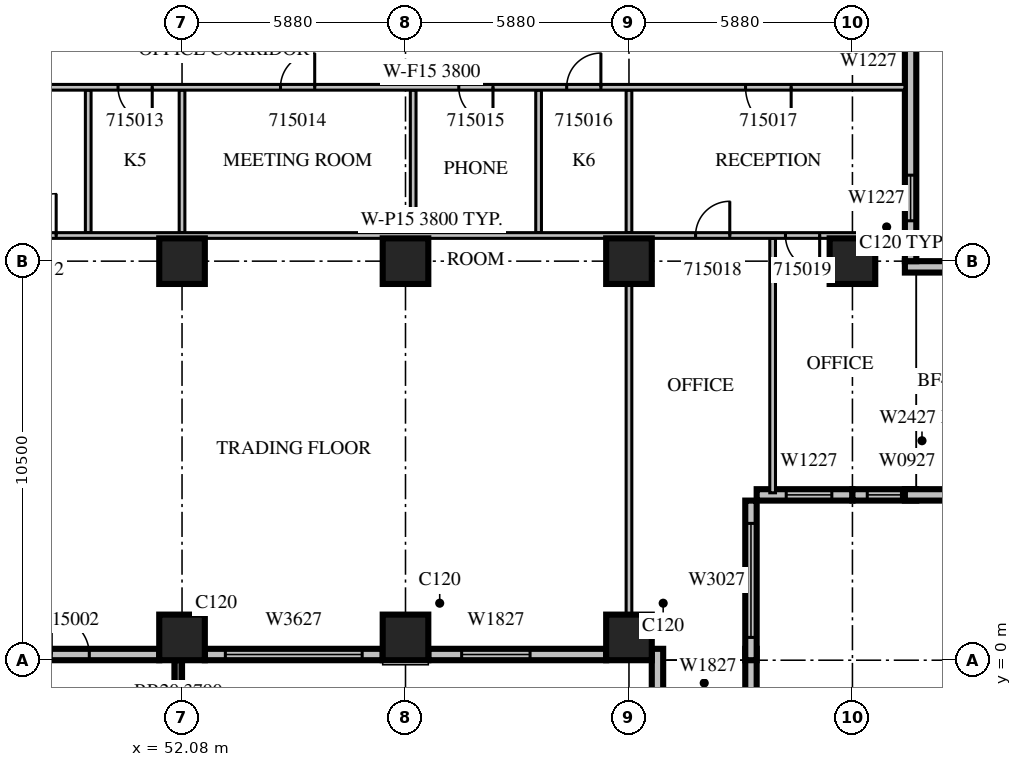
"""IFC4 building model, lengths in metres.
Left out: names, types, materials, properties, quantities, classifications, styles, units other than length and angle.
Written with IfcOpenShell. Run it as: python <this file> out.ifc"""

import sys

from ifc_helpers import new_model, si_unit, direction, frame, frame_2d, origin, origin_2d, place, context, subcontext, project, spatial, rectangle, extrude, source, transform, mapped, element, fill, save


model = new_model("IFC4")
c1 = context("Model", 3, precision=1e-05, world=origin(), true_north=direction((0.0, 1.0)))
c2 = subcontext(c1, "Body", "Model", "MODEL_VIEW")
j1 = project(units=[si_unit("LENGTHUNIT", "METRE"), si_unit("PLANEANGLEUNIT", "RADIAN")], contexts=[c1])
p1 = place(None, origin())
s1 = spatial("IfcSite", under=j1, at=p1, CompositionType="ELEMENT")
p2 = place(p1, origin())
s2 = spatial("IfcBuilding", under=s1, at=p2, CompositionType="ELEMENT")
p3 = place(p2, frame((0.0, 0.0, 74.1)))
s3 = spatial("IfcBuildingStorey", under=s2, at=p3, CompositionType="ELEMENT", Elevation=74.1)
m1 = source(origin(), c2, "Body", "SweptSolid", [
    extrude(rectangle(XDim=1.2, YDim=1.2, at=origin_2d()), origin(), (0.0, 0.0, 1.0), 4.2),
])
for number, where, z_axis, x_axis in (
    (1, (52.08, 0.6, 0.0), (0.0, 0.0, 1.0), (1.0, 0.0, 0.0)),
    (2, (57.96, 0.6, 0.0), (0.0, 0.0, 1.0), (1.0, 0.0, 0.0)),
    (3, (63.84, 0.6, 0.0), (0.0, 0.0, 1.0), (1.0, 0.0, 0.0)),
    (4, (52.08, 10.5, 0.0), (0.0, 0.0, 1.0), (1.0, 0.0, 0.0)),
    (5, (57.96, 10.5, 0.0), (0.0, 0.0, 1.0), (1.0, 0.0, 0.0)),
    (6, (63.84, 10.5, 0.0), (0.0, 0.0, 1.0), (1.0, 0.0, 0.0)),
    (7, (69.72, 10.5, 0.0), (0.0, 0.0, 1.0), (1.0, 0.0, 0.0)),
):
    element("IfcColumn", number, at=place(p3, frame(where, z_axis=z_axis, x_axis=x_axis)), inside=s3, PredefinedType="COLUMN", context=c2, shape_type="MappedRepresentation", body=[
        mapped(m1, transform((0.0, 0.0, 0.0), scale=1.0)),
    ])
m2 = source(origin(), c2, "Body", "SweptSolid", [
    extrude(rectangle(XDim=4.68, YDim=0.3, at=frame_2d((2.34, 0.0))), origin(), (0.0, 0.0, 1.0), 3.8),
])
p4 = place(p3, frame((46.8, 0.15, 0.0), z_axis=(0.0, 0.0, 1.0), x_axis=(1.0, 0.0, 0.0)))
e8 = element("IfcWall", 8, at=p4, inside=s3, PredefinedType="STANDARD", context=c2, shape_type="MappedRepresentation", body=[
    mapped(m2, transform((0.0, 0.0, 0.0), scale=1.0)),
])
m3 = source(origin(), c2, "Body", "SweptSolid", [
    extrude(rectangle(XDim=1.0, YDim=2.1, at=frame_2d((0.5, 1.05))), frame((0.0, 0.16, 0.0), z_axis=(0.0, -1.0, 0.0), x_axis=(1.0, 0.0, 0.0)), (0.0, 0.0, 1.0), 0.32),
])
p5 = place(p4, frame((1.84, 0.0, 0.0)))
e9 = element("IfcOpeningElement", 9, at=p5, cuts=e8, PredefinedType="OPENING", context=c2, shape_type="MappedRepresentation", body=[
    mapped(m3, transform((0.0, 0.0, 0.0), scale=1.0)),
])
p6 = place(p3, frame((52.68, 0.15, 0.0), z_axis=(0.0, 0.0, 1.0), x_axis=(1.0, 0.0, 0.0)))
e10 = element("IfcWall", 10, at=p6, inside=s3, PredefinedType="STANDARD", context=c2, shape_type="MappedRepresentation", body=[
    mapped(m2, transform((0.0, 0.0, 0.0), scale=1.0)),
])
m4 = source(origin(), c2, "Body", "SweptSolid", [
    extrude(rectangle(XDim=3.6, YDim=2.7, at=frame_2d((1.8, 1.35))), frame((0.0, 0.16, 0.0), z_axis=(0.0, -1.0, 0.0), x_axis=(1.0, 0.0, 0.0)), (0.0, 0.0, 1.0), 0.32),
])
p7 = place(p6, frame((0.54, 0.0, 0.6)))
e11 = element("IfcOpeningElement", 11, at=p7, cuts=e10, PredefinedType="OPENING", context=c2, shape_type="MappedRepresentation", body=[
    mapped(m4, transform((0.0, 0.0, 0.0), scale=1.0)),
])
p8 = place(p3, frame((58.56, 0.15, 0.0), z_axis=(0.0, 0.0, 1.0), x_axis=(1.0, 0.0, 0.0)))
e12 = element("IfcWall", 12, at=p8, inside=s3, PredefinedType="STANDARD", context=c2, shape_type="MappedRepresentation", body=[
    mapped(m2, transform((0.0, 0.0, 0.0), scale=1.0)),
])
m5 = source(origin(), c2, "Body", "SweptSolid", [
    extrude(rectangle(XDim=1.8, YDim=2.7, at=frame_2d((0.9, 1.35))), frame((0.0, 0.16, 0.0), z_axis=(0.0, -1.0, 0.0), x_axis=(1.0, 0.0, 0.0)), (0.0, 0.0, 1.0), 0.32),
])
p9 = place(p8, frame((0.877, 0.0, 0.6)))
e13 = element("IfcOpeningElement", 13, at=p9, cuts=e12, PredefinedType="OPENING", context=c2, shape_type="MappedRepresentation", body=[
    mapped(m5, transform((0.0, 0.0, 0.0), scale=1.0)),
])
m6 = source(origin(), c2, "Body", "SweptSolid", [
    extrude(rectangle(XDim=1.2, YDim=0.3, at=frame_2d((0.6, 0.0))), origin(), (0.0, 0.0, 1.0), 3.8),
])
for number, where, z_axis, x_axis in (
    (14, (64.59, 0.3, 0.0), (0.0, 0.0, 1.0), (0.0, -1.0, 0.0)),
    (15, (67.05, 0.3, 0.0), (0.0, 0.0, 1.0), (0.0, -1.0, 0.0)),
):
    element("IfcWall", number, at=place(p3, frame(where, z_axis=z_axis, x_axis=x_axis)), inside=s3, PredefinedType="STANDARD", context=c2, shape_type="MappedRepresentation", body=[
        mapped(m6, transform((0.0, 0.0, 0.0), scale=1.0)),
    ])
m7 = source(origin(), c2, "Body", "SweptSolid", [
    extrude(rectangle(XDim=4.2, YDim=0.3, at=frame_2d((2.1, 0.0))), origin(), (0.0, 0.0, 1.0), 3.8),
])
p10 = place(p3, frame((67.05, 0.0, 0.0), z_axis=(0.0, 0.0, 1.0), x_axis=(0.0, 1.0, 0.0)))
e16 = element("IfcWall", 16, at=p10, inside=s3, PredefinedType="STANDARD", context=c2, shape_type="MappedRepresentation", body=[
    mapped(m7, transform((0.0, 0.0, 0.0), scale=1.0)),
])
m8 = source(origin(), c2, "Body", "SweptSolid", [
    extrude(rectangle(XDim=3.0, YDim=2.7, at=frame_2d((1.5, 1.35))), frame((0.0, 0.16, 0.0), z_axis=(0.0, -1.0, 0.0), x_axis=(1.0, 0.0, 0.0)), (0.0, 0.0, 1.0), 0.32),
])
p11 = place(p10, frame((0.6, 0.0, 0.6)))
e17 = element("IfcOpeningElement", 17, at=p11, cuts=e16, PredefinedType="OPENING", context=c2, shape_type="MappedRepresentation", body=[
    mapped(m8, transform((0.0, 0.0, 0.0), scale=1.0)),
])
m9 = source(origin(), c2, "Body", "SweptSolid", [
    extrude(rectangle(XDim=2.52, YDim=0.3, at=frame_2d((1.26, 0.0))), origin(), (0.0, 0.0, 1.0), 3.8),
])
p12 = place(p3, frame((67.2, 4.35, 0.0), z_axis=(0.0, 0.0, 1.0), x_axis=(1.0, 0.0, 0.0)))
e18 = element("IfcWall", 18, at=p12, inside=s3, PredefinedType="STANDARD", context=c2, shape_type="MappedRepresentation", body=[
    mapped(m9, transform((0.0, 0.0, 0.0), scale=1.0)),
])
m10 = source(origin(), c2, "Body", "SweptSolid", [
    extrude(rectangle(XDim=1.2, YDim=2.7, at=frame_2d((0.6, 1.35))), frame((0.0, 0.16, 0.0), z_axis=(0.0, -1.0, 0.0), x_axis=(1.0, 0.0, 0.0)), (0.0, 0.0, 1.0), 0.32),
])
p13 = place(p12, frame((0.777, 0.0, 0.6)))
e19 = element("IfcOpeningElement", 19, at=p13, cuts=e18, PredefinedType="OPENING", context=c2, shape_type="MappedRepresentation", body=[
    mapped(m10, transform((0.0, 0.0, 0.0), scale=1.0)),
])
m11 = source(origin(), c2, "Body", "SweptSolid", [
    extrude(rectangle(XDim=1.68, YDim=0.3, at=frame_2d((0.84, 0.0))), origin(), (0.0, 0.0, 1.0), 3.8),
])
p14 = place(p3, frame((69.72, 4.35, 0.0), z_axis=(0.0, 0.0, 1.0), x_axis=(1.0, 0.0, 0.0)))
e20 = element("IfcWall", 20, at=p14, inside=s3, PredefinedType="STANDARD", context=c2, shape_type="MappedRepresentation", body=[
    mapped(m11, transform((0.0, 0.0, 0.0), scale=1.0)),
])
m12 = source(origin(), c2, "Body", "SweptSolid", [
    extrude(rectangle(XDim=0.9, YDim=2.7, at=frame_2d((0.45, 1.35))), frame((0.0, 0.16, 0.0), z_axis=(0.0, -1.0, 0.0), x_axis=(1.0, 0.0, 0.0)), (0.0, 0.0, 1.0), 0.32),
])
p15 = place(p14, frame((0.39, 0.0, 0.6)))
e21 = element("IfcOpeningElement", 21, at=p15, cuts=e20, PredefinedType="OPENING", context=c2, shape_type="MappedRepresentation", body=[
    mapped(m12, transform((0.0, 0.0, 0.0), scale=1.0)),
])
for number, where, z_axis, x_axis in (
    (22, (71.1, 4.35, 0.0), (0.0, 0.0, 1.0), (1.0, 0.0, 0.0)),
    (23, (71.1, 10.35, 0.0), (0.0, 0.0, 1.0), (1.0, 0.0, 0.0)),
):
    element("IfcWall", number, at=place(p3, frame(where, z_axis=z_axis, x_axis=x_axis)), inside=s3, PredefinedType="STANDARD", context=c2, shape_type="MappedRepresentation", body=[
        mapped(m6, transform((0.0, 0.0, 0.0), scale=1.0)),
    ])
m13 = source(origin(), c2, "Body", "SweptSolid", [
    extrude(rectangle(XDim=6.3, YDim=0.3, at=frame_2d((3.15, 0.0))), origin(), (0.0, 0.0, 1.0), 3.8),
])
p16 = place(p3, frame((71.25, 10.5, 0.0), z_axis=(0.0, 0.0, 1.0), x_axis=(0.0, 1.0, 0.0)))
e24 = element("IfcWall", 24, at=p16, inside=s3, PredefinedType="STANDARD", context=c2, shape_type="MappedRepresentation", body=[
    mapped(m13, transform((0.0, 0.0, 0.0), scale=1.0)),
])
p17 = place(p16, frame((1.062, 0.0, 0.6)))
e25 = element("IfcOpeningElement", 25, at=p17, cuts=e24, PredefinedType="OPENING", context=c2, shape_type="MappedRepresentation", body=[
    mapped(m10, transform((0.0, 0.0, 0.0), scale=1.0)),
])
m14 = source(origin(), c2, "Body", "SweptSolid", [
    extrude(rectangle(XDim=3.9, YDim=0.2, at=frame_2d((1.95, 0.0))), origin(), (0.0, 0.0, 1.0), 3.79),
])
p18 = place(p3, frame((51.98, 0.0, 0.0), z_axis=(0.0, 0.0, 1.0), x_axis=(0.0, -1.0, 0.0)))
e26 = element("IfcWall", 26, at=p18, inside=s3, PredefinedType="SOLIDWALL", context=c2, shape_type="MappedRepresentation", body=[
    mapped(m14, transform((0.0, 0.0, 0.0), scale=1.0)),
])
m15 = source(origin(), c2, "Body", "SweptSolid", [
    extrude(rectangle(XDim=2.4, YDim=2.7, at=frame_2d((1.2, 1.35))), frame((0.0, 0.11, 0.0), z_axis=(0.0, -1.0, 0.0), x_axis=(1.0, 0.0, 0.0)), (0.0, 0.0, 1.0), 0.22),
])
p19 = place(p18, frame((0.75, 0.0, 0.6)))
e27 = element("IfcOpeningElement", 27, at=p19, cuts=e26, PredefinedType="OPENING", context=c2, shape_type="MappedRepresentation", body=[
    mapped(m15, transform((0.0, 0.0, 0.0), scale=1.0)),
])
m16 = source(origin(), c2, "Body", "SweptSolid", [
    extrude(rectangle(XDim=3.75, YDim=0.15, at=frame_2d((1.875, 0.0))), origin(), (0.0, 0.0, 1.0), 3.8),
])
for number, where, z_axis, x_axis in (
    (28, (49.612, 11.25, 0.0), (0.0, 0.0, 1.0), (0.0, 1.0, 0.0)),
    (29, (52.08, 11.25, 0.0), (0.0, 0.0, 1.0), (0.0, 1.0, 0.0)),
    (30, (58.162, 11.25, 0.0), (0.0, 0.0, 1.0), (0.0, 1.0, 0.0)),
    (31, (61.462, 11.25, 0.0), (0.0, 0.0, 1.0), (0.0, 1.0, 0.0)),
):
    element("IfcWall", number, at=place(p3, frame(where, z_axis=z_axis, x_axis=x_axis)), inside=s3, PredefinedType="PARTITIONING", context=c2, shape_type="MappedRepresentation", body=[
        mapped(m16, transform((0.0, 0.0, 0.0), scale=1.0)),
    ])
m17 = source(origin(), c2, "Body", "SweptSolid", [
    extrude(rectangle(XDim=6.695, YDim=0.15, at=frame_2d((3.348, 0.0))), origin(), (0.0, 0.0, 1.0), 3.8),
])
p20 = place(p3, frame((67.62, 4.405, 0.0), z_axis=(0.0, 0.0, 1.0), x_axis=(0.0, 1.0, 0.0)))
e32 = element("IfcWall", 32, at=p20, inside=s3, PredefinedType="PARTITIONING", context=c2, shape_type="MappedRepresentation", body=[
    mapped(m17, transform((0.0, 0.0, 0.0), scale=1.0)),
])
m18 = source(origin(), c2, "Body", "SweptSolid", [
    extrude(rectangle(XDim=8.702, YDim=0.15, at=frame_2d((4.351, 0.0))), origin(), (0.0, 0.0, 1.0), 3.8),
])
p21 = place(p3, frame((63.84, 1.199, 0.0), z_axis=(0.0, 0.0, 1.0), x_axis=(0.0, 1.0, 0.0)))
e33 = element("IfcWall", 33, at=p21, inside=s3, PredefinedType="PARTITIONING", context=c2, shape_type="MappedRepresentation", body=[
    mapped(m18, transform((0.0, 0.0, 0.0), scale=1.0)),
])
p22 = place(p3, frame((63.84, 11.25, 0.0), z_axis=(0.0, 0.0, 1.0), x_axis=(0.0, 1.0, 0.0)))
e34 = element("IfcWall", 34, at=p22, inside=s3, PredefinedType="PARTITIONING", context=c2, shape_type="MappedRepresentation", body=[
    mapped(m16, transform((0.0, 0.0, 0.0), scale=1.0)),
])
m19 = source(origin(), c2, "Body", "SweptSolid", [
    extrude(rectangle(XDim=24.9, YDim=0.15, at=frame_2d((12.45, 0.0))), origin(), (0.0, 0.0, 1.0), 3.8),
])
p23 = place(p3, frame((71.1, 11.175, 0.0), z_axis=(0.0, 0.0, 1.0), x_axis=(-1.0, 0.0, 0.0)))
e35 = element("IfcWall", 35, at=p23, inside=s3, PredefinedType="PARTITIONING", context=c2, shape_type="MappedRepresentation", body=[
    mapped(m19, transform((0.0, 0.0, 0.0), scale=1.0)),
])
m20 = source(origin(), c2, "Body", "SweptSolid", [
    extrude(rectangle(XDim=1.1, YDim=2.1, at=frame_2d((0.55, 1.05))), frame((0.0, 0.085, 0.0), z_axis=(0.0, -1.0, 0.0), x_axis=(1.0, 0.0, 0.0)), (0.0, 0.0, 1.0), 0.17),
])
p24 = place(p23, frame((22.332, 0.0, 0.0)))
e36 = element("IfcOpeningElement", 36, at=p24, cuts=e35, PredefinedType="OPENING", context=c2, shape_type="MappedRepresentation", body=[
    mapped(m20, transform((0.0, 0.0, 0.0), scale=1.0)),
])
m21 = source(origin(), c2, "Body", "SweptSolid", [
    extrude(rectangle(XDim=0.9, YDim=2.1, at=frame_2d((0.45, 1.05))), frame((0.0, 0.085, 0.0), z_axis=(0.0, -1.0, 0.0), x_axis=(1.0, 0.0, 0.0)), (0.0, 0.0, 1.0), 0.17),
])
p25 = place(p23, frame((4.607, 0.0, 0.0)))
e37 = element("IfcOpeningElement", 37, at=p25, cuts=e35, PredefinedType="OPENING", context=c2, shape_type="MappedRepresentation", body=[
    mapped(m21, transform((0.0, 0.0, 0.0), scale=1.0)),
])
p26 = place(p23, frame((2.243, 0.0, 0.0)))
e38 = element("IfcOpeningElement", 38, at=p26, cuts=e35, PredefinedType="OPENING", context=c2, shape_type="MappedRepresentation", body=[
    mapped(m21, transform((0.0, 0.0, 0.0), scale=1.0)),
])
p27 = place(p3, frame((71.1, 15.075, 0.0), z_axis=(0.0, 0.0, 1.0), x_axis=(-1.0, 0.0, 0.0)))
e39 = element("IfcWall", 39, at=p27, inside=s3, PredefinedType="PARTITIONING", context=c2, shape_type="MappedRepresentation", body=[
    mapped(m19, transform((0.0, 0.0, 0.0), scale=1.0)),
])
p28 = place(p27, frame((22.644, 0.0, 0.0)))
e40 = element("IfcOpeningElement", 40, at=p28, cuts=e39, PredefinedType="OPENING", context=c2, shape_type="MappedRepresentation", body=[
    mapped(m20, transform((0.0, 0.0, 0.0), scale=1.0)),
])
p29 = place(p27, frame((19.804, 0.0, 0.0)))
e41 = element("IfcOpeningElement", 41, at=p29, cuts=e39, PredefinedType="OPENING", context=c2, shape_type="MappedRepresentation", body=[
    mapped(m21, transform((0.0, 0.0, 0.0), scale=1.0)),
])
p30 = place(p27, frame((15.529, 0.0, 0.0)))
e42 = element("IfcOpeningElement", 42, at=p30, cuts=e39, PredefinedType="OPENING", context=c2, shape_type="MappedRepresentation", body=[
    mapped(m21, transform((0.0, 0.0, 0.0), scale=1.0)),
])
p31 = place(p27, frame((10.838, 0.0, 0.0)))
e43 = element("IfcOpeningElement", 43, at=p31, cuts=e39, PredefinedType="OPENING", context=c2, shape_type="MappedRepresentation", body=[
    mapped(m21, transform((0.0, 0.0, 0.0), scale=1.0)),
])
p32 = place(p27, frame((7.999, 0.0, 0.0)))
e44 = element("IfcOpeningElement", 44, at=p32, cuts=e39, PredefinedType="OPENING", context=c2, shape_type="MappedRepresentation", body=[
    mapped(m21, transform((0.0, 0.0, 0.0), scale=1.0)),
])
m22 = source(origin(), c2, "Body", "SweptSolid", [
    extrude(rectangle(XDim=1.2, YDim=2.1, at=frame_2d((0.6, 1.05))), frame((0.0, 0.085, 0.0), z_axis=(0.0, -1.0, 0.0), x_axis=(1.0, 0.0, 0.0)), (0.0, 0.0, 1.0), 0.17),
])
p33 = place(p27, frame((2.993, 0.0, 0.0)))
e45 = element("IfcOpeningElement", 45, at=p33, cuts=e39, PredefinedType="OPENING", context=c2, shape_type="MappedRepresentation", body=[
    mapped(m22, transform((0.0, 0.0, 0.0), scale=1.0)),
])
m23 = source(origin(), c2, "Body", "SweptSolid", [
    extrude(rectangle(XDim=3.6, YDim=2.7, at=frame_2d((1.8, 1.35))), frame((0.0, 0.03, 0.0), z_axis=(0.0, -1.0, 0.0), x_axis=(1.0, 0.0, 0.0)), (0.0, 0.0, 1.0), 0.06),
])
p34 = place(p7, origin())
e46 = element("IfcWindow", 46, at=p34, inside=s3, PartitioningType="SINGLE_PANEL", PredefinedType="WINDOW", context=c2, shape_type="MappedRepresentation", body=[
    mapped(m23, transform((0.0, 0.0, 0.0), scale=1.0)),
])
fill(e11, e46)
m24 = source(origin(), c2, "Body", "SweptSolid", [
    extrude(rectangle(XDim=1.8, YDim=2.7, at=frame_2d((0.9, 1.35))), frame((0.0, 0.03, 0.0), z_axis=(0.0, -1.0, 0.0), x_axis=(1.0, 0.0, 0.0)), (0.0, 0.0, 1.0), 0.06),
])
p35 = place(p9, origin())
e47 = element("IfcWindow", 47, at=p35, inside=s3, PartitioningType="SINGLE_PANEL", PredefinedType="WINDOW", context=c2, shape_type="MappedRepresentation", body=[
    mapped(m24, transform((0.0, 0.0, 0.0), scale=1.0)),
])
fill(e13, e47)
m25 = source(origin(), c2, "Body", "SweptSolid", [
    extrude(rectangle(XDim=3.0, YDim=2.7, at=frame_2d((1.5, 1.35))), frame((0.0, 0.03, 0.0), z_axis=(0.0, -1.0, 0.0), x_axis=(1.0, 0.0, 0.0)), (0.0, 0.0, 1.0), 0.06),
])
p36 = place(p11, origin())
e48 = element("IfcWindow", 48, at=p36, inside=s3, PartitioningType="SINGLE_PANEL", PredefinedType="WINDOW", context=c2, shape_type="MappedRepresentation", body=[
    mapped(m25, transform((0.0, 0.0, 0.0), scale=1.0)),
])
fill(e17, e48)
m26 = source(origin(), c2, "Body", "SweptSolid", [
    extrude(rectangle(XDim=1.2, YDim=2.7, at=frame_2d((0.6, 1.35))), frame((0.0, 0.03, 0.0), z_axis=(0.0, -1.0, 0.0), x_axis=(1.0, 0.0, 0.0)), (0.0, 0.0, 1.0), 0.06),
])
p37 = place(p13, origin())
e49 = element("IfcWindow", 49, at=p37, inside=s3, PartitioningType="SINGLE_PANEL", PredefinedType="WINDOW", context=c2, shape_type="MappedRepresentation", body=[
    mapped(m26, transform((0.0, 0.0, 0.0), scale=1.0)),
])
fill(e19, e49)
m27 = source(origin(), c2, "Body", "SweptSolid", [
    extrude(rectangle(XDim=0.9, YDim=2.7, at=frame_2d((0.45, 1.35))), frame((0.0, 0.03, 0.0), z_axis=(0.0, -1.0, 0.0), x_axis=(1.0, 0.0, 0.0)), (0.0, 0.0, 1.0), 0.06),
])
p38 = place(p15, origin())
e50 = element("IfcWindow", 50, at=p38, inside=s3, PartitioningType="SINGLE_PANEL", PredefinedType="WINDOW", context=c2, shape_type="MappedRepresentation", body=[
    mapped(m27, transform((0.0, 0.0, 0.0), scale=1.0)),
])
fill(e21, e50)
p39 = place(p17, origin())
e51 = element("IfcWindow", 51, at=p39, inside=s3, PartitioningType="SINGLE_PANEL", PredefinedType="WINDOW", context=c2, shape_type="MappedRepresentation", body=[
    mapped(m26, transform((0.0, 0.0, 0.0), scale=1.0)),
])
fill(e25, e51)
m28 = source(origin(), c2, "Body", "SweptSolid", [
    extrude(rectangle(XDim=1.1, YDim=2.1, at=frame_2d((0.55, 1.05))), frame((0.0, 0.025, 0.0), z_axis=(0.0, -1.0, 0.0), x_axis=(1.0, 0.0, 0.0)), (0.0, 0.0, 1.0), 0.05),
])
p40 = place(p24, origin())
e52 = element("IfcDoor", 52, at=p40, inside=s3, OperationType="SINGLE_SWING_RIGHT", PredefinedType="DOOR", context=c2, shape_type="MappedRepresentation", body=[
    mapped(m28, transform((0.0, 0.0, 0.0), scale=1.0)),
])
fill(e36, e52)
m29 = source(origin(), c2, "Body", "SweptSolid", [
    extrude(rectangle(XDim=0.9, YDim=2.1, at=frame_2d((0.45, 1.05))), frame((0.0, 0.025, 0.0), z_axis=(0.0, -1.0, 0.0), x_axis=(1.0, 0.0, 0.0)), (0.0, 0.0, 1.0), 0.05),
])
p41 = place(p29, origin())
e53 = element("IfcDoor", 53, at=p41, inside=s3, OperationType="SINGLE_SWING_LEFT", PredefinedType="DOOR", context=c2, shape_type="MappedRepresentation", body=[
    mapped(m29, transform((0.0, 0.0, 0.0), scale=1.0)),
])
fill(e41, e53)
p42 = place(p30, origin())
e54 = element("IfcDoor", 54, at=p42, inside=s3, OperationType="SINGLE_SWING_RIGHT", PredefinedType="DOOR", context=c2, shape_type="MappedRepresentation", body=[
    mapped(m29, transform((0.0, 0.0, 0.0), scale=1.0)),
])
fill(e42, e54)
p43 = place(p31, origin())
e55 = element("IfcDoor", 55, at=p43, inside=s3, OperationType="SINGLE_SWING_LEFT", PredefinedType="DOOR", context=c2, shape_type="MappedRepresentation", body=[
    mapped(m29, transform((0.0, 0.0, 0.0), scale=1.0)),
])
fill(e43, e55)
p44 = place(p32, origin())
e56 = element("IfcDoor", 56, at=p44, inside=s3, OperationType="SINGLE_SWING_RIGHT", PredefinedType="DOOR", context=c2, shape_type="MappedRepresentation", body=[
    mapped(m29, transform((0.0, 0.0, 0.0), scale=1.0)),
])
fill(e44, e56)
m30 = source(origin(), c2, "Body", "SweptSolid", [
    extrude(rectangle(XDim=1.2, YDim=2.1, at=frame_2d((0.6, 1.05))), frame((0.0, 0.025, 0.0), z_axis=(0.0, -1.0, 0.0), x_axis=(1.0, 0.0, 0.0)), (0.0, 0.0, 1.0), 0.05),
])
p45 = place(p33, origin())
e57 = element("IfcDoor", 57, at=p45, inside=s3, OperationType="SINGLE_SWING_LEFT", PredefinedType="DOOR", context=c2, shape_type="MappedRepresentation", body=[
    mapped(m30, transform((0.0, 0.0, 0.0), scale=1.0)),
])
fill(e45, e57)
p46 = place(p25, origin())
e58 = element("IfcDoor", 58, at=p46, inside=s3, OperationType="SINGLE_SWING_RIGHT", PredefinedType="DOOR", context=c2, shape_type="MappedRepresentation", body=[
    mapped(m29, transform((0.0, 0.0, 0.0), scale=1.0)),
])
fill(e37, e58)
p47 = place(p26, origin())
e59 = element("IfcDoor", 59, at=p47, inside=s3, OperationType="SINGLE_SWING_LEFT", PredefinedType="DOOR", context=c2, shape_type="MappedRepresentation", body=[
    mapped(m29, transform((0.0, 0.0, 0.0), scale=1.0)),
])
fill(e38, e59)
m31 = source(origin(), c2, "Body", "SweptSolid", [
    extrude(rectangle(XDim=1.0, YDim=2.1, at=frame_2d((0.5, 1.05))), frame((0.0, 0.025, 0.0), z_axis=(0.0, -1.0, 0.0), x_axis=(1.0, 0.0, 0.0)), (0.0, 0.0, 1.0), 0.05),
])
p48 = place(p5, origin())
e60 = element("IfcDoor", 60, at=p48, inside=s3, OperationType="SINGLE_SWING_LEFT", PredefinedType="DOOR", context=c2, shape_type="MappedRepresentation", body=[
    mapped(m31, transform((0.0, 0.0, 0.0), scale=1.0)),
])
fill(e9, e60)
save(model, sys.argv[1])
